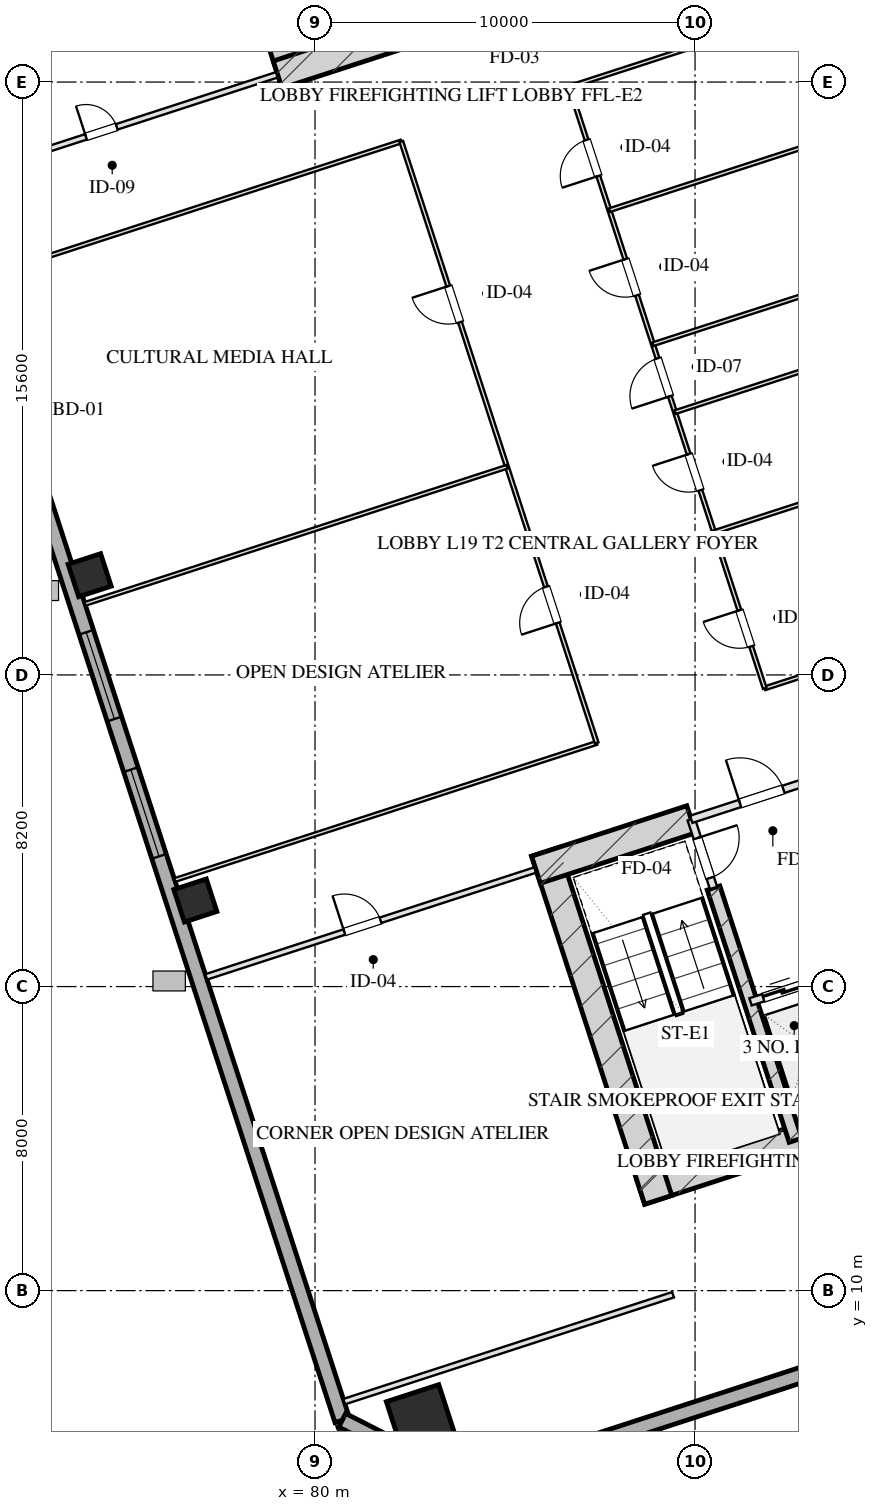
"""IFC4 building model, lengths in metres.
Left out: names, types, materials, properties, quantities, classifications, styles, units other than length and angle.
Written with IfcOpenShell. Run it as: python <this file> out.ifc"""

import sys

from ifc_helpers import new_model, si_unit, direction, frame, frame_2d, origin, origin_2d, place, context, subcontext, project, spatial, rectangle, hollow_rectangle, extrude, element, fill, save


model = new_model("IFC4")
c1 = context("Model", 3, precision=1e-05, world=origin(), true_north=direction((0.0, 1.0)))
c2 = subcontext(c1, "Body", "Model", "MODEL_VIEW")
j1 = project(units=[si_unit("LENGTHUNIT", "METRE"), si_unit("PLANEANGLEUNIT", "RADIAN")], contexts=[c1])
p1 = place(None, origin())
s1 = spatial("IfcSite", under=j1, at=p1, CompositionType="ELEMENT")
p2 = place(p1, origin())
s2 = spatial("IfcBuilding", under=s1, at=p2, CompositionType="ELEMENT")
p3 = place(p2, frame((0.0, 0.0, 78.2)))
s3 = spatial("IfcBuildingStorey", under=s2, at=p3, CompositionType="ELEMENT", Elevation=78.2)
p4 = place(p3, frame((88.559, 12.629, 0.0), z_axis=(0.0, 0.0, 1.0), x_axis=(0.951056072937, 0.309018358888, 0.0)))
e1 = element("IfcWall", 1, at=p4, inside=s3, PredefinedType="SHEAR", context=c2, shape_type="SweptSolid", body=[
    extrude(rectangle(XDim=16.55, YDim=0.75, at=frame_2d((8.275, 0.0))), origin(), (0.0, 0.0, 1.0), 3.45),
])
p5 = place(p3, frame((86.055, 21.546, 0.0), z_axis=(0.0, 0.0, 1.0), x_axis=(0.309023585745, -0.951054374604, 0.0)))
e2 = element("IfcWall", 2, at=p5, inside=s3, PredefinedType="SHEAR", context=c2, shape_type="SweptSolid", body=[
    extrude(rectangle(XDim=9.63, YDim=0.75, at=frame_2d((4.815, 0.0))), origin(), (0.0, 0.0, 1.0), 3.45),
])
p6 = place(p3, frame((90.486, 20.594, 0.0), z_axis=(0.0, 0.0, 1.0), x_axis=(0.309020428229, -0.951055400562, 0.0)))
e3 = element("IfcWall", 3, at=p6, inside=s3, PredefinedType="SHEAR", context=c2, shape_type="SweptSolid", body=[
    extrude(rectangle(XDim=6.98, YDim=0.35, at=frame_2d((3.49, 0.0))), origin(), (0.0, 0.0, 1.0), 3.45),
])
p7 = place(p3, frame((85.814, 21.074, 0.0), z_axis=(0.0, 0.0, 1.0), x_axis=(0.95106580992, 0.308988390074, 0.0)))
e4 = element("IfcWall", 4, at=p7, inside=s3, PredefinedType="SHEAR", context=c2, shape_type="SweptSolid", body=[
    extrude(rectangle(XDim=4.295, YDim=0.75, at=frame_2d((2.147, 0.0))), origin(), (0.0, 0.0, 1.0), 3.45),
])
p8 = place(p3, frame((79.489, 41.756, 0.0), z_axis=(0.0, 0.0, 1.0), x_axis=(-0.309016134813, 0.951056795583, 0.0)))
e5 = element("IfcWall", 5, at=p8, inside=s3, PredefinedType="SHEAR", context=c2, shape_type="SweptSolid", body=[
    extrude(rectangle(XDim=9.63, YDim=0.75, at=frame_2d((4.815, 0.0))), origin(), (0.0, 0.0, 1.0), 3.45),
])
p9 = place(p3, frame((79.016, 41.997, 0.0), z_axis=(0.0, 0.0, 1.0), x_axis=(0.95106038264, 0.309005094736, 0.0)))
e6 = element("IfcWall", 6, at=p9, inside=s3, PredefinedType="SHEAR", context=c2, shape_type="SweptSolid", body=[
    extrude(rectangle(XDim=4.295, YDim=0.75, at=frame_2d((2.147, 0.0))), origin(), (0.0, 0.0, 1.0), 3.45),
])
p10 = place(p3, frame((82.791, 6.612, 0.0), z_axis=(0.0, 0.0, 1.0), x_axis=(0.951056516295, 0.309016994375, 0.0)))
e7 = element("IfcColumn", 7, at=p10, inside=s3, PredefinedType="COLUMN", context=c2, shape_type="SweptSolid", body=[
    extrude(hollow_rectangle(XDim=1.45, YDim=1.45, WallThickness=0.05, at=origin_2d()), origin(), (0.0, 0.0, 1.0), 3.451),
])
for number, where, z_axis, x_axis in (
    (8, (76.851, 20.264, 0.0), (0.0, 0.0, 1.0), (0.951, 0.309, 0.0)),
    (9, (74.07, 28.824, 0.0), (0.0, 0.0, 1.0), (0.951, 0.309, 0.0)),
):
    element("IfcColumn", number, at=place(p3, frame(where, z_axis=z_axis, x_axis=x_axis)), inside=s3, PredefinedType="COLUMN", context=c2, shape_type="SweptSolid", body=[
        extrude(hollow_rectangle(XDim=0.9, YDim=0.9, WallThickness=0.032, at=origin_2d()), origin(), (0.0, 0.0, 1.0), 3.451),
    ])
p11 = place(p3, frame((80.716, 6.59, 0.0), z_axis=(0.0, 0.0, 1.0), x_axis=(-0.309017542002, 0.95105633836, 0.0)))
e10 = element("IfcWall", 10, at=p11, inside=s3, PredefinedType="SOLIDWALL", context=c2, shape_type="SweptSolid", body=[
    extrude(rectangle(XDim=46.4, YDim=0.4, at=frame_2d((23.2, 0.0))), origin(), (0.0, 0.0, 1.0), 2.61),
])
p12 = place(p11, frame((15.6, 0.0, 0.75)))
e11 = element("IfcOpeningElement", 11, at=p12, cuts=e10, PredefinedType="OPENING", context=c2, shape_type="SweptSolid", body=[
    extrude(rectangle(XDim=2.4, YDim=1.46, at=frame_2d((1.2, 0.73))), frame((0.0, 0.21, 0.0), z_axis=(0.0, -1.0, 0.0), x_axis=(1.0, 0.0, 0.0)), (0.0, 0.0, 1.0), 0.42),
])
p13 = place(p11, frame((19.4, 0.0, 0.75)))
e12 = element("IfcOpeningElement", 12, at=p13, cuts=e10, PredefinedType="OPENING", context=c2, shape_type="SweptSolid", body=[
    extrude(rectangle(XDim=2.4, YDim=1.46, at=frame_2d((1.2, 0.73))), frame((0.0, 0.21, 0.0), z_axis=(0.0, -1.0, 0.0), x_axis=(1.0, 0.0, 0.0)), (0.0, 0.0, 1.0), 0.42),
])
p14 = place(p11, frame((27.05, 0.0, 0.0)))
e13 = element("IfcOpeningElement", 13, at=p14, cuts=e10, PredefinedType="OPENING", context=c2, shape_type="SweptSolid", body=[
    extrude(rectangle(XDim=1.1, YDim=2.15, at=frame_2d((0.55, 1.075))), frame((0.0, 0.21, 0.0), z_axis=(0.0, -1.0, 0.0), x_axis=(1.0, 0.0, 0.0)), (0.0, 0.0, 1.0), 0.42),
])
p15 = place(p3, frame((111.953, 14.005, 0.0), z_axis=(0.0, 0.0, 1.0), x_axis=(-0.95105505922, -0.309021478754, 0.0)))
e14 = element("IfcWall", 14, at=p15, inside=s3, PredefinedType="SOLIDWALL", context=c2, shape_type="SweptSolid", body=[
    extrude(rectangle(XDim=29.4, YDim=0.4, at=frame_2d((14.7, 0.0))), origin(), (0.0, 0.0, 1.0), 2.61),
])
p16 = place(p3, frame((83.992, 4.92, 0.0), z_axis=(0.0, 0.0, 1.0), x_axis=(-0.891001999643, 0.45399937955, 0.0)))
e15 = element("IfcWall", 15, at=p16, inside=s3, PredefinedType="SOLIDWALL", context=c2, shape_type="SweptSolid", body=[
    extrude(rectangle(XDim=3.677, YDim=0.4, at=frame_2d((1.839, 0.0))), origin(), (0.0, 0.0, 1.0), 2.61),
])
p17 = place(p3, frame((89.899, 22.401, 0.0), z_axis=(0.0, 0.0, 1.0), x_axis=(0.308932062672, -0.951084108086, 0.0)))
e16 = element("IfcWall", 16, at=p17, inside=s3, PredefinedType="PARTITIONING", context=c2, shape_type="SweptSolid", body=[
    extrude(rectangle(XDim=1.9, YDim=0.2, at=frame_2d((0.95, 0.0))), origin(), (0.0, 0.0, 1.0), 3.175),
])
p18 = place(p17, frame((0.52, 0.0, 0.0)))
e17 = element("IfcOpeningElement", 17, at=p18, cuts=e16, PredefinedType="OPENING", context=c2, shape_type="SweptSolid", body=[
    extrude(rectangle(XDim=1.1, YDim=2.05, at=frame_2d((0.55, 1.025))), frame((0.0, 0.11, 0.0), z_axis=(0.0, -1.0, 0.0), x_axis=(1.0, 0.0, 0.0)), (0.0, 0.0, 1.0), 0.22),
])
p19 = place(p3, frame((89.899, 22.401, 0.0), z_axis=(0.0, 0.0, 1.0), x_axis=(0.951046716504, 0.309047153403, 0.0)))
e18 = element("IfcWall", 18, at=p19, inside=s3, PredefinedType="PARTITIONING", context=c2, shape_type="SweptSolid", body=[
    extrude(rectangle(XDim=3.83, YDim=0.2, at=frame_2d((1.915, 0.0))), origin(), (0.0, 0.0, 1.0), 3.175),
])
p20 = place(p19, frame((1.35, 0.0, 0.0)))
e19 = element("IfcOpeningElement", 19, at=p20, cuts=e18, PredefinedType="OPENING", context=c2, shape_type="SweptSolid", body=[
    extrude(rectangle(XDim=1.2, YDim=2.05, at=frame_2d((0.6, 1.025))), frame((0.0, 0.11, 0.0), z_axis=(0.0, -1.0, 0.0), x_axis=(1.0, 0.0, 0.0)), (0.0, 0.0, 1.0), 0.22),
])
p21 = place(p3, frame((91.46, 17.598, 0.0), z_axis=(0.0, 0.0, 1.0), x_axis=(0.951062257173, 0.308999325213, 0.0)))
e20 = element("IfcWall", 20, at=p21, inside=s3, PredefinedType="PARTITIONING", context=c2, shape_type="SweptSolid", body=[
    extrude(rectangle(XDim=2.1, YDim=0.2, at=frame_2d((1.05, 0.0))), origin(), (0.0, 0.0, 1.0), 3.175),
])
p22 = place(p21, frame((0.35, 0.0, 0.0)))
e21 = element("IfcOpeningElement", 21, at=p22, cuts=e20, PredefinedType="OPENING", context=c2, shape_type="SweptSolid", body=[
    extrude(rectangle(XDim=1.1, YDim=2.05, at=frame_2d((0.55, 1.025))), frame((0.0, 0.11, 0.0), z_axis=(0.0, -1.0, 0.0), x_axis=(1.0, 0.0, 0.0)), (0.0, 0.0, 1.0), 0.22),
])
p23 = place(p3, frame((80.767, 7.079, 0.0), z_axis=(0.0, 0.0, 1.0), x_axis=(0.951057133767, 0.309015093986, 0.0)))
e22 = element("IfcWall", 22, at=p23, inside=s3, PredefinedType="PARTITIONING", context=c2, shape_type="SweptSolid", body=[
    extrude(rectangle(XDim=9.1, YDim=0.15, at=frame_2d((4.55, 0.0))), origin(), (0.0, 0.0, 1.0), 3.175),
])
p24 = place(p3, frame((77.136, 18.254, 0.0), z_axis=(0.0, 0.0, 1.0), x_axis=(0.951057133767, 0.309015093986, 0.0)))
e23 = element("IfcWall", 23, at=p24, inside=s3, PredefinedType="PARTITIONING", context=c2, shape_type="SweptSolid", body=[
    extrude(rectangle(XDim=9.1, YDim=0.15, at=frame_2d((4.55, 0.0))), origin(), (0.0, 0.0, 1.0), 3.175),
])
p25 = place(p24, frame((3.822, 0.0, 0.0)))
e24 = element("IfcOpeningElement", 24, at=p25, cuts=e23, PredefinedType="OPENING", context=c2, shape_type="SweptSolid", body=[
    extrude(rectangle(XDim=1.0, YDim=2.05, at=frame_2d((0.5, 1.025))), frame((0.0, 0.085, 0.0), z_axis=(0.0, -1.0, 0.0), x_axis=(1.0, 0.0, 0.0)), (0.0, 0.0, 1.0), 0.17),
])
p26 = place(p3, frame((70.338, 39.177, 0.0), z_axis=(0.0, 0.0, 1.0), x_axis=(0.951059695568, 0.309007209409, 0.0)))
e25 = element("IfcWall", 25, at=p26, inside=s3, PredefinedType="PARTITIONING", context=c2, shape_type="SweptSolid", body=[
    extrude(rectangle(XDim=9.1, YDim=0.15, at=frame_2d((4.55, 0.0))), origin(), (0.0, 0.0, 1.0), 3.175),
])
p27 = place(p26, frame((3.822, 0.0, 0.0)))
e26 = element("IfcOpeningElement", 26, at=p27, cuts=e25, PredefinedType="OPENING", context=c2, shape_type="SweptSolid", body=[
    extrude(rectangle(XDim=0.85, YDim=2.05, at=frame_2d((0.425, 1.025))), frame((0.0, 0.085, 0.0), z_axis=(0.0, -1.0, 0.0), x_axis=(1.0, 0.0, 0.0)), (0.0, 0.0, 1.0), 0.17),
])
p28 = place(p3, frame((76.308, 20.803, 0.0), z_axis=(0.0, 0.0, 1.0), x_axis=(0.951054504848, 0.309023184905, 0.0)))
e27 = element("IfcWall", 27, at=p28, inside=s3, PredefinedType="MOVABLE", context=c2, shape_type="SweptSolid", body=[
    extrude(rectangle(XDim=11.675, YDim=0.1, at=frame_2d((5.838, 0.0))), origin(), (0.0, 0.0, 1.0), 3.175),
])
p29 = place(p3, frame((91.834, 25.848, 0.0), z_axis=(0.0, 0.0, 1.0), x_axis=(0.951055746746, 0.309019362795, 0.0)))
e28 = element("IfcWall", 28, at=p29, inside=s3, PredefinedType="MOVABLE", context=c2, shape_type="SweptSolid", body=[
    extrude(rectangle(XDim=17.875, YDim=0.1, at=frame_2d((8.938, 0.0))), origin(), (0.0, 0.0, 1.0), 3.175),
])
p30 = place(p3, frame((71.166, 36.629, 0.0), z_axis=(0.0, 0.0, 1.0), x_axis=(0.951058653673, 0.309010416124, 0.0)))
e29 = element("IfcWall", 29, at=p30, inside=s3, PredefinedType="MOVABLE", context=c2, shape_type="SweptSolid", body=[
    extrude(rectangle(XDim=11.675, YDim=0.1, at=frame_2d((5.837, 0.0))), origin(), (0.0, 0.0, 1.0), 3.175),
])
p31 = place(p3, frame((86.692, 41.673, 0.0), z_axis=(0.0, 0.0, 1.0), x_axis=(0.951057050993, 0.309015348739, 0.0)))
e30 = element("IfcWall", 30, at=p31, inside=s3, PredefinedType="MOVABLE", context=c2, shape_type="SweptSolid", body=[
    extrude(rectangle(XDim=17.875, YDim=0.1, at=frame_2d((8.938, 0.0))), origin(), (0.0, 0.0, 1.0), 3.175),
])
p32 = place(p3, frame((87.412, 24.411, 0.0), z_axis=(0.0, 0.0, 1.0), x_axis=(-0.309022042254, 0.951054876125, 0.0)))
e31 = element("IfcWall", 31, at=p32, inside=s3, PredefinedType="MOVABLE", context=c2, shape_type="SweptSolid", body=[
    extrude(rectangle(XDim=16.64, YDim=0.1, at=frame_2d((8.32, 0.0))), origin(), (0.0, 0.0, 1.0), 3.175),
])
p33 = place(p32, frame((3.32, 0.0, 0.0)))
e32 = element("IfcOpeningElement", 32, at=p33, cuts=e31, PredefinedType="OPENING", context=c2, shape_type="SweptSolid", body=[
    extrude(rectangle(XDim=1.0, YDim=2.05, at=frame_2d((0.5, 1.025))), frame((0.0, 0.06, 0.0), z_axis=(0.0, -1.0, 0.0), x_axis=(1.0, 0.0, 0.0)), (0.0, 0.0, 1.0), 0.12),
])
p34 = place(p32, frame((11.64, 0.0, 0.0)))
e33 = element("IfcOpeningElement", 33, at=p34, cuts=e31, PredefinedType="OPENING", context=c2, shape_type="SweptSolid", body=[
    extrude(rectangle(XDim=1.0, YDim=2.05, at=frame_2d((0.5, 1.025))), frame((0.0, 0.06, 0.0), z_axis=(0.0, -1.0, 0.0), x_axis=(1.0, 0.0, 0.0)), (0.0, 0.0, 1.0), 0.12),
])
p35 = place(p3, frame((91.834, 25.848, 0.0), z_axis=(0.0, 0.0, 1.0), x_axis=(-0.30901773025, 0.951056277195, 0.0)))
e34 = element("IfcWall", 34, at=p35, inside=s3, PredefinedType="MOVABLE", context=c2, shape_type="SweptSolid", body=[
    extrude(rectangle(XDim=16.64, YDim=0.1, at=frame_2d((8.32, 0.0))), origin(), (0.0, 0.0, 1.0), 3.175),
])
p36 = place(p35, frame((1.16, 0.0, 0.0)))
e35 = element("IfcOpeningElement", 35, at=p36, cuts=e34, PredefinedType="OPENING", context=c2, shape_type="SweptSolid", body=[
    extrude(rectangle(XDim=1.0, YDim=2.05, at=frame_2d((0.5, 1.025))), frame((0.0, 0.06, 0.0), z_axis=(0.0, -1.0, 0.0), x_axis=(1.0, 0.0, 0.0)), (0.0, 0.0, 1.0), 0.12),
])
p37 = place(p35, frame((5.48, 0.0, 0.0)))
e36 = element("IfcOpeningElement", 36, at=p37, cuts=e34, PredefinedType="OPENING", context=c2, shape_type="SweptSolid", body=[
    extrude(rectangle(XDim=1.0, YDim=2.05, at=frame_2d((0.5, 1.025))), frame((0.0, 0.06, 0.0), z_axis=(0.0, -1.0, 0.0), x_axis=(1.0, 0.0, 0.0)), (0.0, 0.0, 1.0), 0.12),
])
p38 = place(p35, frame((8.08, 0.0, 0.0)))
e37 = element("IfcOpeningElement", 37, at=p38, cuts=e34, PredefinedType="OPENING", context=c2, shape_type="SweptSolid", body=[
    extrude(rectangle(XDim=1.05, YDim=2.05, at=frame_2d((0.525, 1.025))), frame((0.0, 0.06, 0.0), z_axis=(0.0, -1.0, 0.0), x_axis=(1.0, 0.0, 0.0)), (0.0, 0.0, 1.0), 0.12),
])
p39 = place(p35, frame((10.874, 0.0, 0.0)))
e38 = element("IfcOpeningElement", 38, at=p39, cuts=e34, PredefinedType="OPENING", context=c2, shape_type="SweptSolid", body=[
    extrude(rectangle(XDim=1.0, YDim=2.05, at=frame_2d((0.5, 1.025))), frame((0.0, 0.06, 0.0), z_axis=(0.0, -1.0, 0.0), x_axis=(1.0, 0.0, 0.0)), (0.0, 0.0, 1.0), 0.12),
])
p40 = place(p35, frame((14.174, 0.0, 0.0)))
e39 = element("IfcOpeningElement", 39, at=p40, cuts=e34, PredefinedType="OPENING", context=c2, shape_type="SweptSolid", body=[
    extrude(rectangle(XDim=1.0, YDim=2.05, at=frame_2d((0.5, 1.025))), frame((0.0, 0.06, 0.0), z_axis=(0.0, -1.0, 0.0), x_axis=(1.0, 0.0, 0.0)), (0.0, 0.0, 1.0), 0.12),
])
p41 = place(p3, frame((73.947, 28.069, 0.0), z_axis=(0.0, 0.0, 1.0), x_axis=(0.951058653673, 0.309010416124, 0.0)))
e40 = element("IfcWall", 40, at=p41, inside=s3, PredefinedType="MOVABLE", context=c2, shape_type="SweptSolid", body=[
    extrude(rectangle(XDim=11.675, YDim=0.1, at=frame_2d((5.837, 0.0))), origin(), (0.0, 0.0, 1.0), 3.175),
])
for number, where, z_axis, x_axis in (
    (41, (90.499, 29.956, 0.0), (0.0, 0.0, 1.0), (0.951, 0.309, 0.0)),
    (42, (89.473, 33.114, 0.0), (0.0, 0.0, 1.0), (0.951, 0.309, 0.0)),
):
    element("IfcWall", number, at=place(p3, frame(where, z_axis=z_axis, x_axis=x_axis)), inside=s3, PredefinedType="MOVABLE", context=c2, shape_type="SweptSolid", body=[
        extrude(rectangle(XDim=17.875, YDim=0.1, at=frame_2d((8.938, 0.0))), origin(), (0.0, 0.0, 1.0), 3.175),
    ])
for number, where, z_axis, x_axis in (
    (43, (88.892, 34.902, 0.0), (0.0, 0.0, 1.0), (0.951, 0.309, 0.0)),
    (44, (87.746, 38.429, 0.0), (0.0, 0.0, 1.0), (0.951, 0.309, 0.0)),
):
    element("IfcWall", number, at=place(p3, frame(where, z_axis=z_axis, x_axis=x_axis)), inside=s3, PredefinedType="MOVABLE", context=c2, shape_type="SweptSolid", body=[
        extrude(rectangle(XDim=17.875, YDim=0.1, at=frame_2d((8.938, 0.0))), origin(), (0.0, 0.0, 1.0), 3.175),
    ])
p42 = place(p12, origin())
e45 = element("IfcWindow", 45, at=p42, inside=s3, PartitioningType="TRIPLE_PANEL_VERTICAL", PredefinedType="WINDOW", context=c2, shape_type="SweptSolid", body=[
    extrude(rectangle(XDim=2.4, YDim=1.46, at=frame_2d((1.2, 0.73))), frame((0.0, 0.03, 0.0), z_axis=(0.0, -1.0, 0.0), x_axis=(1.0, 0.0, 0.0)), (0.0, 0.0, 1.0), 0.06),
])
fill(e11, e45)
p43 = place(p13, origin())
e46 = element("IfcWindow", 46, at=p43, inside=s3, PartitioningType="TRIPLE_PANEL_VERTICAL", PredefinedType="WINDOW", context=c2, shape_type="SweptSolid", body=[
    extrude(rectangle(XDim=2.4, YDim=1.46, at=frame_2d((1.2, 0.73))), frame((0.0, 0.03, 0.0), z_axis=(0.0, -1.0, 0.0), x_axis=(1.0, 0.0, 0.0)), (0.0, 0.0, 1.0), 0.06),
])
fill(e12, e46)
p44 = place(p18, origin())
e47 = element("IfcDoor", 47, at=p44, inside=s3, OperationType="SINGLE_SWING_LEFT", PredefinedType="DOOR", context=c2, shape_type="SweptSolid", body=[
    extrude(rectangle(XDim=1.1, YDim=2.05, at=frame_2d((0.55, 1.025))), frame((0.0, 0.025, 0.0), z_axis=(0.0, -1.0, 0.0), x_axis=(1.0, 0.0, 0.0)), (0.0, 0.0, 1.0), 0.05),
])
fill(e17, e47)
p45 = place(p20, origin())
e48 = element("IfcDoor", 48, at=p45, inside=s3, OperationType="SINGLE_SWING_LEFT", PredefinedType="DOOR", context=c2, shape_type="SweptSolid", body=[
    extrude(rectangle(XDim=1.2, YDim=2.05, at=frame_2d((0.6, 1.025))), frame((0.0, 0.025, 0.0), z_axis=(0.0, -1.0, 0.0), x_axis=(1.0, 0.0, 0.0)), (0.0, 0.0, 1.0), 0.05),
])
fill(e19, e48)
p46 = place(p22, origin())
e49 = element("IfcDoor", 49, at=p46, inside=s3, OperationType="DOUBLE_DOOR_SLIDING", PredefinedType="DOOR", context=c2, shape_type="SweptSolid", body=[
    extrude(rectangle(XDim=1.1, YDim=2.05, at=frame_2d((0.55, 1.025))), frame((0.0, 0.025, 0.0), z_axis=(0.0, -1.0, 0.0), x_axis=(1.0, 0.0, 0.0)), (0.0, 0.0, 1.0), 0.05),
])
fill(e21, e49)
p47 = place(p25, origin())
e50 = element("IfcDoor", 50, at=p47, inside=s3, OperationType="SINGLE_SWING_LEFT", PredefinedType="DOOR", context=c2, shape_type="SweptSolid", body=[
    extrude(rectangle(XDim=1.0, YDim=2.05, at=frame_2d((0.5, 1.025))), frame((0.0, 0.025, 0.0), z_axis=(0.0, -1.0, 0.0), x_axis=(1.0, 0.0, 0.0)), (0.0, 0.0, 1.0), 0.05),
])
fill(e24, e50)
p48 = place(p27, origin())
e51 = element("IfcDoor", 51, at=p48, inside=s3, OperationType="SINGLE_SWING_LEFT", PredefinedType="DOOR", context=c2, shape_type="SweptSolid", body=[
    extrude(rectangle(XDim=0.85, YDim=2.05, at=frame_2d((0.425, 1.025))), frame((0.0, 0.025, 0.0), z_axis=(0.0, -1.0, 0.0), x_axis=(1.0, 0.0, 0.0)), (0.0, 0.0, 1.0), 0.05),
])
fill(e26, e51)
p49 = place(p33, origin())
e52 = element("IfcDoor", 52, at=p49, inside=s3, OperationType="SINGLE_SWING_LEFT", PredefinedType="DOOR", context=c2, shape_type="SweptSolid", body=[
    extrude(rectangle(XDim=1.0, YDim=2.05, at=frame_2d((0.5, 1.025))), frame((0.0, 0.025, 0.0), z_axis=(0.0, -1.0, 0.0), x_axis=(1.0, 0.0, 0.0)), (0.0, 0.0, 1.0), 0.05),
])
fill(e32, e52)
p50 = place(p34, origin())
e53 = element("IfcDoor", 53, at=p50, inside=s3, OperationType="SINGLE_SWING_RIGHT", PredefinedType="DOOR", context=c2, shape_type="SweptSolid", body=[
    extrude(rectangle(XDim=1.0, YDim=2.05, at=frame_2d((0.5, 1.025))), frame((0.0, 0.025, 0.0), z_axis=(0.0, -1.0, 0.0), x_axis=(1.0, 0.0, 0.0)), (0.0, 0.0, 1.0), 0.05),
])
fill(e33, e53)
p51 = place(p36, origin())
e54 = element("IfcDoor", 54, at=p51, inside=s3, OperationType="SINGLE_SWING_RIGHT", PredefinedType="DOOR", context=c2, shape_type="SweptSolid", body=[
    extrude(rectangle(XDim=1.0, YDim=2.05, at=frame_2d((0.5, 1.025))), frame((0.0, 0.025, 0.0), z_axis=(0.0, -1.0, 0.0), x_axis=(1.0, 0.0, 0.0)), (0.0, 0.0, 1.0), 0.05),
])
fill(e35, e54)
p52 = place(p37, origin())
e55 = element("IfcDoor", 55, at=p52, inside=s3, OperationType="SINGLE_SWING_RIGHT", PredefinedType="DOOR", context=c2, shape_type="SweptSolid", body=[
    extrude(rectangle(XDim=1.0, YDim=2.05, at=frame_2d((0.5, 1.025))), frame((0.0, 0.025, 0.0), z_axis=(0.0, -1.0, 0.0), x_axis=(1.0, 0.0, 0.0)), (0.0, 0.0, 1.0), 0.05),
])
fill(e36, e55)
p53 = place(p38, origin())
e56 = element("IfcDoor", 56, at=p53, inside=s3, OperationType="SINGLE_SWING_LEFT", PredefinedType="DOOR", context=c2, shape_type="SweptSolid", body=[
    extrude(rectangle(XDim=1.05, YDim=2.05, at=frame_2d((0.525, 1.025))), frame((0.0, 0.025, 0.0), z_axis=(0.0, -1.0, 0.0), x_axis=(1.0, 0.0, 0.0)), (0.0, 0.0, 1.0), 0.05),
])
fill(e37, e56)
p54 = place(p39, origin())
e57 = element("IfcDoor", 57, at=p54, inside=s3, OperationType="SINGLE_SWING_RIGHT", PredefinedType="DOOR", context=c2, shape_type="SweptSolid", body=[
    extrude(rectangle(XDim=1.0, YDim=2.05, at=frame_2d((0.5, 1.025))), frame((0.0, 0.025, 0.0), z_axis=(0.0, -1.0, 0.0), x_axis=(1.0, 0.0, 0.0)), (0.0, 0.0, 1.0), 0.05),
])
fill(e38, e57)
p55 = place(p40, origin())
e58 = element("IfcDoor", 58, at=p55, inside=s3, OperationType="SINGLE_SWING_LEFT", PredefinedType="DOOR", context=c2, shape_type="SweptSolid", body=[
    extrude(rectangle(XDim=1.0, YDim=2.05, at=frame_2d((0.5, 1.025))), frame((0.0, 0.025, 0.0), z_axis=(0.0, -1.0, 0.0), x_axis=(1.0, 0.0, 0.0)), (0.0, 0.0, 1.0), 0.05),
])
fill(e39, e58)
save(model, sys.argv[1])
